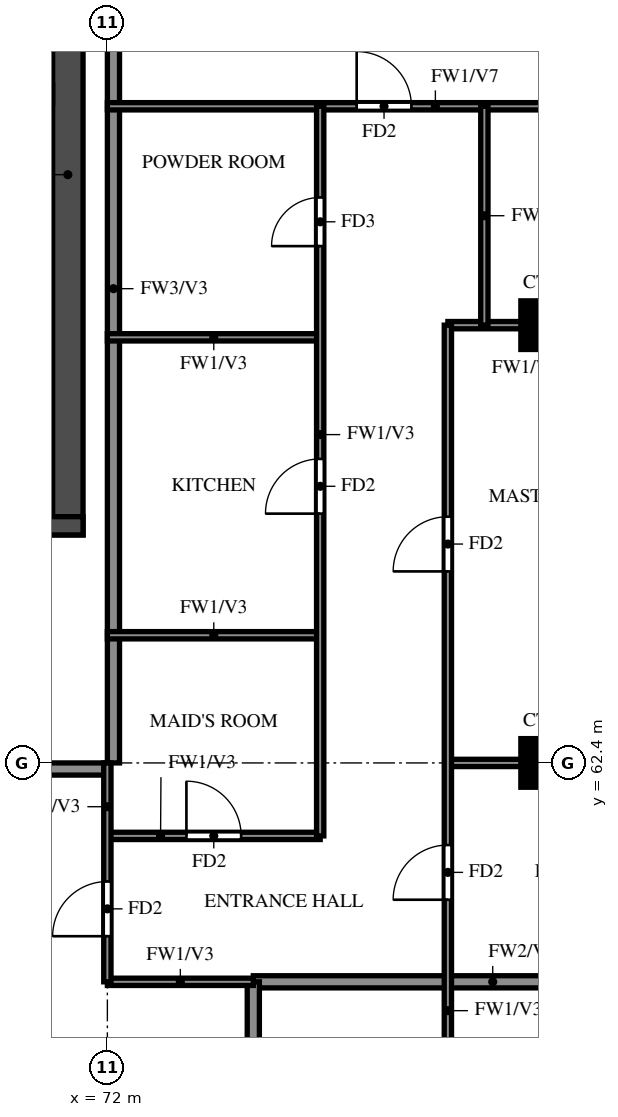
"""IFC4 building model, lengths in metres.
Left out: names, types, materials, properties, quantities, classifications, styles, units other than length and angle.
Written with IfcOpenShell. Run it as: python <this file> out.ifc"""

import sys

from ifc_helpers import new_model, si_unit, direction, frame, frame_2d, origin, origin_2d, place, context, subcontext, project, spatial, rectangle, extrude, source, transform, mapped, element, fill, save


model = new_model("IFC4")
c1 = context("Model", 3, precision=1e-05, world=origin(), true_north=direction((0.0, 1.0)))
c2 = subcontext(c1, "Body", "Model", "MODEL_VIEW")
j1 = project(units=[si_unit("LENGTHUNIT", "METRE"), si_unit("PLANEANGLEUNIT", "RADIAN")], contexts=[c1])
p1 = place(None, origin())
s1 = spatial("IfcSite", under=j1, at=p1, CompositionType="ELEMENT")
p2 = place(p1, origin())
s2 = spatial("IfcBuilding", under=s1, at=p2, CompositionType="ELEMENT")
p3 = place(p2, frame((0.0, 0.0, 250.0)))
s3 = spatial("IfcBuildingStorey", under=s2, at=p3, CompositionType="ELEMENT", Elevation=250.0)
m1 = source(origin(), c2, "Body", "SweptSolid", [
    extrude(rectangle(XDim=0.8, YDim=0.8, at=origin_2d()), origin(), (0.0, 0.0, 1.0), 3.22),
])
for number, where, z_axis, x_axis in (
    (1, (79.2, 62.4, 0.0), (0.0, 0.0, 1.0), (1.0, 0.0, 0.0)),
    (2, (79.2, 69.6, 0.0), (0.0, 0.0, 1.0), (1.0, 0.0, 0.0)),
):
    element("IfcColumn", number, at=place(p3, frame(where, z_axis=z_axis, x_axis=x_axis)), inside=s3, PredefinedType="COLUMN", context=c2, shape_type="MappedRepresentation", body=[
        mapped(m1, transform((0.0, 0.0, 0.0))),
    ])
p4 = place(p3, frame((71.35, 66.15, 0.0), z_axis=(0.0, 0.0, 1.0), x_axis=(0.0, 1.0, 0.0)))
e3 = element("IfcWall", 3, at=p4, inside=s3, PredefinedType="SHEAR", context=c2, shape_type="SweptSolid", body=[
    extrude(rectangle(XDim=11.85, YDim=0.5, at=frame_2d((5.925, 0.0))), origin(), (0.0, 0.0, 1.0), 3.22),
])
p5 = place(p3, frame((29.2, 66.3, 0.0), z_axis=(0.0, 0.0, 1.0), x_axis=(1.0, 0.0, 0.0)))
e4 = element("IfcWall", 4, at=p5, inside=s3, PredefinedType="SHEAR", context=c2, shape_type="SweptSolid", body=[
    extrude(rectangle(XDim=42.4, YDim=0.3, at=frame_2d((21.2, 0.0))), origin(), (0.0, 0.0, 1.0), 3.22),
])
p6 = place(p5, frame((1.425, 0.0, 0.0)))
e5 = element("IfcOpeningElement", 5, at=p6, cuts=e4, PredefinedType="OPENING", context=c2, shape_type="SweptSolid", body=[
    extrude(rectangle(XDim=1.1, YDim=2.1, at=frame_2d((0.55, 1.05))), frame((0.0, 0.16, 0.0), z_axis=(0.0, -1.0, 0.0), x_axis=(1.0, 0.0, 0.0)), (0.0, 0.0, 1.0), 0.32),
])
p7 = place(p5, frame((4.2, 0.0, 0.0)))
e6 = element("IfcOpeningElement", 6, at=p7, cuts=e4, PredefinedType="OPENING", context=c2, shape_type="SweptSolid", body=[
    extrude(rectangle(XDim=1.8, YDim=2.1, at=frame_2d((0.9, 1.05))), frame((0.0, 0.16, 0.0), z_axis=(0.0, -1.0, 0.0), x_axis=(1.0, 0.0, 0.0)), (0.0, 0.0, 1.0), 0.32),
])
p8 = place(p3, frame((67.2, 62.3, 0.0), z_axis=(0.0, 0.0, 1.0), x_axis=(1.0, 0.0, 0.0)))
e7 = element("IfcWall", 7, at=p8, inside=s3, PredefinedType="SOLIDWALL", context=c2, shape_type="SweptSolid", body=[
    extrude(rectangle(XDim=4.8, YDim=0.2, at=frame_2d((2.4, 0.0))), origin(), (0.0, 0.0, 1.0), 3.22),
])
p9 = place(p3, frame((72.1, 62.4, 0.0), z_axis=(0.0, 0.0, 1.0), x_axis=(0.0, 1.0, 0.0)))
e8 = element("IfcWall", 8, at=p9, inside=s3, PredefinedType="SOLIDWALL", context=c2, shape_type="SweptSolid", body=[
    extrude(rectangle(XDim=15.6, YDim=0.2, at=frame_2d((7.8, 0.0))), origin(), (0.0, 0.0, 1.0), 3.22),
])
p10 = place(p3, frame((74.4, 58.8, 0.0), z_axis=(0.0, 0.0, 1.0), x_axis=(1.0, 0.0, 0.0)))
e9 = element("IfcWall", 9, at=p10, inside=s3, PredefinedType="SOLIDWALL", context=c2, shape_type="SweptSolid", body=[
    extrude(rectangle(XDim=7.875, YDim=0.2, at=frame_2d((3.938, 0.0))), origin(), (0.0, 0.0, 1.0), 2.32),
])
p11 = place(p3, frame((74.4, 56.4, 0.0), z_axis=(0.0, 0.0, 1.0), x_axis=(0.0, 1.0, 0.0)))
e10 = element("IfcWall", 10, at=p11, inside=s3, PredefinedType="SOLIDWALL", context=c2, shape_type="SweptSolid", body=[
    extrude(rectangle(XDim=2.4, YDim=0.2, at=frame_2d((1.2, 0.0))), origin(), (0.0, 0.0, 1.0), 3.22),
])
p12 = place(p3, frame((72.0, 58.8, 0.0), z_axis=(0.0, 0.0, 1.0), x_axis=(1.0, 0.0, 0.0)))
e11 = element("IfcWall", 11, at=p12, inside=s3, PredefinedType="PARTITIONING", context=c2, shape_type="SweptSolid", body=[
    extrude(rectangle(XDim=2.4, YDim=0.12, at=frame_2d((1.2, 0.0))), origin(), (0.0, 0.0, 1.0), 3.22),
])
p13 = place(p3, frame((72.0, 61.2, 0.0), z_axis=(0.0, 0.0, 1.0), x_axis=(1.0, 0.0, 0.0)))
e12 = element("IfcWall", 12, at=p13, inside=s3, PredefinedType="PARTITIONING", context=c2, shape_type="SweptSolid", body=[
    extrude(rectangle(XDim=3.5, YDim=0.12, at=frame_2d((1.75, 0.0))), origin(), (0.0, 0.0, 1.0), 3.22),
])
p14 = place(p13, frame((1.3, 0.0, 0.0)))
e13 = element("IfcOpeningElement", 13, at=p14, cuts=e12, PredefinedType="OPENING", context=c2, shape_type="SweptSolid", body=[
    extrude(rectangle(XDim=0.9, YDim=2.1, at=frame_2d((0.45, 1.05))), frame((0.0, 0.07, 0.0), z_axis=(0.0, -1.0, 0.0), x_axis=(1.0, 0.0, 0.0)), (0.0, 0.0, 1.0), 0.14),
])
p15 = place(p3, frame((77.6, 62.4, 0.0), z_axis=(0.0, 0.0, 1.0), x_axis=(1.0, 0.0, 0.0)))
e14 = element("IfcWall", 14, at=p15, inside=s3, PredefinedType="PARTITIONING", context=c2, shape_type="SweptSolid", body=[
    extrude(rectangle(XDim=4.675, YDim=0.12, at=frame_2d((2.337, 0.0))), origin(), (0.0, 0.0, 1.0), 3.22),
])
for number, where, z_axis, x_axis in (
    (15, (72.0, 64.5, 0.0), (0.0, 0.0, 1.0), (1.0, 0.0, 0.0)),
    (16, (72.0, 69.4, 0.0), (0.0, 0.0, 1.0), (1.0, 0.0, 0.0)),
):
    element("IfcWall", number, at=place(p3, frame(where, z_axis=z_axis, x_axis=x_axis)), inside=s3, PredefinedType="PARTITIONING", context=c2, shape_type="SweptSolid", body=[
        extrude(rectangle(XDim=3.5, YDim=0.12, at=frame_2d((1.75, 0.0))), origin(), (0.0, 0.0, 1.0), 3.22),
    ])
p16 = place(p3, frame((77.6, 69.6, 0.0), z_axis=(0.0, 0.0, 1.0), x_axis=(1.0, 0.0, 0.0)))
e17 = element("IfcWall", 17, at=p16, inside=s3, PredefinedType="PARTITIONING", context=c2, shape_type="SweptSolid", body=[
    extrude(rectangle(XDim=4.675, YDim=0.12, at=frame_2d((2.337, 0.0))), origin(), (0.0, 0.0, 1.0), 3.22),
])
p17 = place(p16, frame((2.337, 0.0, 0.0)))
e18 = element("IfcOpeningElement", 18, at=p17, cuts=e17, PredefinedType="OPENING", context=c2, shape_type="SweptSolid", body=[
    extrude(rectangle(XDim=0.8, YDim=2.1, at=frame_2d((0.4, 1.05))), frame((0.0, 0.07, 0.0), z_axis=(0.0, -1.0, 0.0), x_axis=(1.0, 0.0, 0.0)), (0.0, 0.0, 1.0), 0.14),
])
p18 = place(p3, frame((72.0, 73.2, 0.0), z_axis=(0.0, 0.0, 1.0), x_axis=(1.0, 0.0, 0.0)))
e19 = element("IfcWall", 19, at=p18, inside=s3, PredefinedType="PARTITIONING", context=c2, shape_type="SweptSolid", body=[
    extrude(rectangle(XDim=10.275, YDim=0.12, at=frame_2d((5.137, 0.0))), origin(), (0.0, 0.0, 1.0), 2.32),
])
p19 = place(p18, frame((4.1, 0.0, 0.0)))
e20 = element("IfcOpeningElement", 20, at=p19, cuts=e19, PredefinedType="OPENING", context=c2, shape_type="SweptSolid", body=[
    extrude(rectangle(XDim=0.9, YDim=2.1, at=frame_2d((0.45, 1.05))), frame((0.0, 0.07, 0.0), z_axis=(0.0, -1.0, 0.0), x_axis=(1.0, 0.0, 0.0)), (0.0, 0.0, 1.0), 0.14),
])
p20 = place(p3, frame((72.0, 58.8, 0.0), z_axis=(0.0, 0.0, 1.0), x_axis=(0.0, 1.0, 0.0)))
e21 = element("IfcWall", 21, at=p20, inside=s3, PredefinedType="PARTITIONING", context=c2, shape_type="SweptSolid", body=[
    extrude(rectangle(XDim=3.6, YDim=0.12, at=frame_2d((1.8, 0.0))), origin(), (0.0, 0.0, 1.0), 3.22),
])
p21 = place(p20, frame((0.75, 0.0, 0.0)))
e22 = element("IfcOpeningElement", 22, at=p21, cuts=e21, PredefinedType="OPENING", context=c2, shape_type="SweptSolid", body=[
    extrude(rectangle(XDim=0.9, YDim=2.1, at=frame_2d((0.45, 1.05))), frame((0.0, 0.07, 0.0), z_axis=(0.0, -1.0, 0.0), x_axis=(1.0, 0.0, 0.0)), (0.0, 0.0, 1.0), 0.14),
])
p22 = place(p3, frame((75.5, 61.2, 0.0), z_axis=(0.0, 0.0, 1.0), x_axis=(0.0, 1.0, 0.0)))
e23 = element("IfcWall", 23, at=p22, inside=s3, PredefinedType="PARTITIONING", context=c2, shape_type="SweptSolid", body=[
    extrude(rectangle(XDim=12.0, YDim=0.12, at=frame_2d((6.0, 0.0))), origin(), (0.0, 0.0, 1.0), 3.22),
])
p23 = place(p22, frame((5.3, 0.0, 0.0)))
e24 = element("IfcOpeningElement", 24, at=p23, cuts=e23, PredefinedType="OPENING", context=c2, shape_type="SweptSolid", body=[
    extrude(rectangle(XDim=0.9, YDim=2.1, at=frame_2d((0.45, 1.05))), frame((0.0, 0.07, 0.0), z_axis=(0.0, -1.0, 0.0), x_axis=(1.0, 0.0, 0.0)), (0.0, 0.0, 1.0), 0.14),
])
p24 = place(p22, frame((9.7, 0.0, 0.0)))
e25 = element("IfcOpeningElement", 25, at=p24, cuts=e23, PredefinedType="OPENING", context=c2, shape_type="SweptSolid", body=[
    extrude(rectangle(XDim=0.8, YDim=2.1, at=frame_2d((0.4, 1.05))), frame((0.0, 0.07, 0.0), z_axis=(0.0, -1.0, 0.0), x_axis=(1.0, 0.0, 0.0)), (0.0, 0.0, 1.0), 0.14),
])
p25 = place(p3, frame((77.6, 48.125, 0.0), z_axis=(0.0, 0.0, 1.0), x_axis=(0.0, 1.0, 0.0)))
e26 = element("IfcWall", 26, at=p25, inside=s3, PredefinedType="PARTITIONING", context=c2, shape_type="SweptSolid", body=[
    extrude(rectangle(XDim=21.475, YDim=0.12, at=frame_2d((10.738, 0.0))), origin(), (0.0, 0.0, 1.0), 3.22),
])
p26 = place(p25, frame((2.788, 0.0, 0.0)))
e27 = element("IfcOpeningElement", 27, at=p26, cuts=e26, PredefinedType="OPENING", context=c2, shape_type="SweptSolid", body=[
    extrude(rectangle(XDim=1.5, YDim=2.1, at=frame_2d((0.75, 1.05))), frame((0.0, 0.07, 0.0), z_axis=(0.0, -1.0, 0.0), x_axis=(1.0, 0.0, 0.0)), (0.0, 0.0, 1.0), 0.14),
])
p27 = place(p25, frame((8.425, 0.0, 0.0)))
e28 = element("IfcOpeningElement", 28, at=p27, cuts=e26, PredefinedType="OPENING", context=c2, shape_type="SweptSolid", body=[
    extrude(rectangle(XDim=0.9, YDim=2.1, at=frame_2d((0.45, 1.05))), frame((0.0, 0.07, 0.0), z_axis=(0.0, -1.0, 0.0), x_axis=(1.0, 0.0, 0.0)), (0.0, 0.0, 1.0), 0.14),
])
p28 = place(p25, frame((12.025, 0.0, 0.0)))
e29 = element("IfcOpeningElement", 29, at=p28, cuts=e26, PredefinedType="OPENING", context=c2, shape_type="SweptSolid", body=[
    extrude(rectangle(XDim=0.9, YDim=2.1, at=frame_2d((0.45, 1.05))), frame((0.0, 0.07, 0.0), z_axis=(0.0, -1.0, 0.0), x_axis=(1.0, 0.0, 0.0)), (0.0, 0.0, 1.0), 0.14),
])
p29 = place(p25, frame((17.425, 0.0, 0.0)))
e30 = element("IfcOpeningElement", 30, at=p29, cuts=e26, PredefinedType="OPENING", context=c2, shape_type="SweptSolid", body=[
    extrude(rectangle(XDim=0.9, YDim=2.1, at=frame_2d((0.45, 1.05))), frame((0.0, 0.07, 0.0), z_axis=(0.0, -1.0, 0.0), x_axis=(1.0, 0.0, 0.0)), (0.0, 0.0, 1.0), 0.14),
])
p30 = place(p3, frame((78.2, 69.6, 0.0), z_axis=(0.0, 0.0, 1.0), x_axis=(0.0, 1.0, 0.0)))
e31 = element("IfcWall", 31, at=p30, inside=s3, PredefinedType="PARTITIONING", context=c2, shape_type="SweptSolid", body=[
    extrude(rectangle(XDim=3.6, YDim=0.12, at=frame_2d((1.8, 0.0))), origin(), (0.0, 0.0, 1.0), 3.22),
])
p31 = place(p21, origin())
e32 = element("IfcDoor", 32, at=p31, inside=s3, OperationType="SINGLE_SWING_LEFT", PredefinedType="DOOR", context=c2, shape_type="SweptSolid", body=[
    extrude(rectangle(XDim=0.9, YDim=2.1, at=frame_2d((0.45, 1.05))), frame((0.0, 0.025, 0.0), z_axis=(0.0, -1.0, 0.0), x_axis=(1.0, 0.0, 0.0)), (0.0, 0.0, 1.0), 0.05),
])
fill(e22, e32)
p32 = place(p28, origin())
e33 = element("IfcDoor", 33, at=p32, inside=s3, OperationType="SINGLE_SWING_RIGHT", PredefinedType="DOOR", context=c2, shape_type="SweptSolid", body=[
    extrude(rectangle(XDim=0.9, YDim=2.1, at=frame_2d((0.45, 1.05))), frame((0.0, 0.025, 0.0), z_axis=(0.0, -1.0, 0.0), x_axis=(1.0, 0.0, 0.0)), (0.0, 0.0, 1.0), 0.05),
])
fill(e29, e33)
p33 = place(p29, origin())
e34 = element("IfcDoor", 34, at=p33, inside=s3, OperationType="SINGLE_SWING_LEFT", PredefinedType="DOOR", context=c2, shape_type="SweptSolid", body=[
    extrude(rectangle(XDim=0.9, YDim=2.1, at=frame_2d((0.45, 1.05))), frame((0.0, 0.025, 0.0), z_axis=(0.0, -1.0, 0.0), x_axis=(1.0, 0.0, 0.0)), (0.0, 0.0, 1.0), 0.05),
])
fill(e30, e34)
p34 = place(p19, origin())
e35 = element("IfcDoor", 35, at=p34, inside=s3, OperationType="SINGLE_SWING_RIGHT", PredefinedType="DOOR", context=c2, shape_type="SweptSolid", body=[
    extrude(rectangle(XDim=0.9, YDim=2.1, at=frame_2d((0.45, 1.05))), frame((0.0, 0.025, 0.0), z_axis=(0.0, -1.0, 0.0), x_axis=(1.0, 0.0, 0.0)), (0.0, 0.0, 1.0), 0.05),
])
fill(e20, e35)
p35 = place(p14, origin())
e36 = element("IfcDoor", 36, at=p35, inside=s3, OperationType="SINGLE_SWING_LEFT", PredefinedType="DOOR", context=c2, shape_type="SweptSolid", body=[
    extrude(rectangle(XDim=0.9, YDim=2.1, at=frame_2d((0.45, 1.05))), frame((0.0, 0.025, 0.0), z_axis=(0.0, -1.0, 0.0), x_axis=(1.0, 0.0, 0.0)), (0.0, 0.0, 1.0), 0.05),
])
fill(e13, e36)
p36 = place(p23, origin())
e37 = element("IfcDoor", 37, at=p36, inside=s3, OperationType="SINGLE_SWING_LEFT", PredefinedType="DOOR", context=c2, shape_type="SweptSolid", body=[
    extrude(rectangle(XDim=0.9, YDim=2.1, at=frame_2d((0.45, 1.05))), frame((0.0, 0.025, 0.0), z_axis=(0.0, -1.0, 0.0), x_axis=(1.0, 0.0, 0.0)), (0.0, 0.0, 1.0), 0.05),
])
fill(e24, e37)
p37 = place(p24, origin())
e38 = element("IfcDoor", 38, at=p37, inside=s3, OperationType="SINGLE_SWING_RIGHT", PredefinedType="DOOR", context=c2, shape_type="SweptSolid", body=[
    extrude(rectangle(XDim=0.8, YDim=2.1, at=frame_2d((0.4, 1.05))), frame((0.0, 0.025, 0.0), z_axis=(0.0, -1.0, 0.0), x_axis=(1.0, 0.0, 0.0)), (0.0, 0.0, 1.0), 0.05),
])
fill(e25, e38)
save(model, sys.argv[1])
